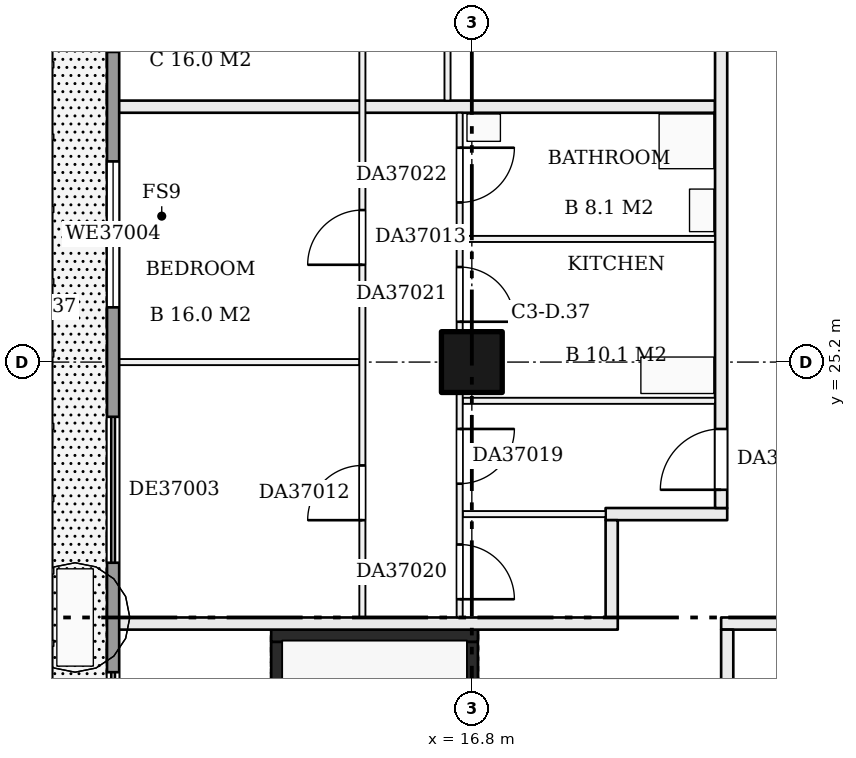
"""IFC4 building model, lengths in metres.
Left out: names, types, materials, properties, quantities, classifications, styles, units other than length and angle.
Written with IfcOpenShell. Run it as: python <this file> out.ifc"""

import sys

from ifc_helpers import new_model, si_unit, direction, frame, frame_2d, origin, origin_2d, place, context, subcontext, project, spatial, rectangle, extrude, element, fill, save


model = new_model("IFC4")
c1 = context("Model", 3, precision=1e-05, world=origin(), true_north=direction((0.0, 1.0)))
c2 = subcontext(c1, "Body", "Model", "MODEL_VIEW")
j1 = project(units=[si_unit("LENGTHUNIT", "METRE"), si_unit("PLANEANGLEUNIT", "RADIAN")], contexts=[c1])
p1 = place(None, origin())
s1 = spatial("IfcSite", under=j1, at=p1, CompositionType="ELEMENT")
p2 = place(p1, origin())
s2 = spatial("IfcBuilding", under=s1, at=p2, CompositionType="ELEMENT")
p3 = place(p2, frame((0.0, 0.0, 147.7)))
s3 = spatial("IfcBuildingStorey", under=s2, at=p3, CompositionType="ELEMENT", Elevation=147.7)
p4 = place(p3, frame((16.8, 25.2, 0.0), z_axis=(0.0, 0.0, 1.0), x_axis=(1.0, 0.0, 0.0)))
e1 = element("IfcColumn", 1, at=p4, inside=s3, PredefinedType="COLUMN", context=c2, shape_type="SweptSolid", body=[
    extrude(rectangle(XDim=1.0, YDim=1.0, at=origin_2d()), origin(), (0.0, 0.0, 1.0), 3.22),
])
p5 = place(p3, frame((13.6, 13.8, 0.0), z_axis=(0.0, 0.0, 1.0), x_axis=(0.0, 1.0, 0.0)))
e2 = element("IfcWall", 2, at=p5, inside=s3, PredefinedType="SHEAR", context=c2, shape_type="SweptSolid", body=[
    extrude(rectangle(XDim=6.8, YDim=0.2, at=frame_2d((3.4, 0.0))), origin(), (0.0, 0.0, 1.0), 3.22),
])
p6 = place(p3, frame((16.8, 13.8, 0.0), z_axis=(0.0, 0.0, 1.0), x_axis=(0.0, 1.0, 0.0)))
e3 = element("IfcWall", 3, at=p6, inside=s3, PredefinedType="SHEAR", context=c2, shape_type="SweptSolid", body=[
    extrude(rectangle(XDim=6.8, YDim=0.2, at=frame_2d((3.4, 0.0))), origin(), (0.0, 0.0, 1.0), 3.22),
])
p7 = place(p6, frame((0.1, 0.0, 0.0)))
e4 = element("IfcOpeningElement", 4, at=p7, cuts=e3, PredefinedType="OPENING", context=c2, shape_type="SweptSolid", body=[
    extrude(rectangle(XDim=1.0, YDim=2.1, at=frame_2d((0.5, 1.05))), frame((0.0, 0.11, 0.0), z_axis=(0.0, -1.0, 0.0), x_axis=(1.0, 0.0, 0.0)), (0.0, 0.0, 1.0), 0.22),
])
p8 = place(p3, frame((13.5, 20.7, 0.0), z_axis=(0.0, 0.0, 1.0), x_axis=(1.0, 0.0, 0.0)))
e5 = element("IfcWall", 5, at=p8, inside=s3, PredefinedType="SHEAR", context=c2, shape_type="SweptSolid", body=[
    extrude(rectangle(XDim=3.4, YDim=0.2, at=frame_2d((1.7, 0.0))), origin(), (0.0, 0.0, 1.0), 3.22),
])
p9 = place(p3, frame((10.9, 20.9, 0.0), z_axis=(0.0, 0.0, 1.0), x_axis=(1.0, 0.0, 0.0)))
e6 = element("IfcWall", 6, at=p9, inside=s3, PredefinedType="PARTITIONING", context=c2, shape_type="SweptSolid", body=[
    extrude(rectangle(XDim=8.3, YDim=0.2, at=frame_2d((4.15, 0.0))), origin(), (0.0, 0.0, 1.0), 3.22),
])
p10 = place(p3, frame((20.9, 20.9, 0.0), z_axis=(0.0, 0.0, 1.0), x_axis=(1.0, 0.0, 0.0)))
e7 = element("IfcWall", 7, at=p10, inside=s3, PredefinedType="PARTITIONING", context=c2, shape_type="SweptSolid", body=[
    extrude(rectangle(XDim=19.3, YDim=0.2, at=frame_2d((9.65, 0.0))), origin(), (0.0, 0.0, 1.0), 3.22),
])
p11 = place(p3, frame((16.65, 22.7, 0.0), z_axis=(0.0, 0.0, 1.0), x_axis=(1.0, 0.0, 0.0)))
e8 = element("IfcWall", 8, at=p11, inside=s3, PredefinedType="PARTITIONING", context=c2, shape_type="SweptSolid", body=[
    extrude(rectangle(XDim=2.35, YDim=0.1, at=frame_2d((1.175, 0.0))), origin(), (0.0, 0.0, 1.0), 3.22),
])
p12 = place(p3, frame((19.0, 22.7, 0.0), z_axis=(0.0, 0.0, 1.0), x_axis=(1.0, 0.0, 0.0)))
e9 = element("IfcWall", 9, at=p12, inside=s3, PredefinedType="PARTITIONING", context=c2, shape_type="SweptSolid", body=[
    extrude(rectangle(XDim=2.0, YDim=0.2, at=frame_2d((1.0, 0.0))), origin(), (0.0, 0.0, 1.0), 3.22),
])
p13 = place(p3, frame((16.65, 24.563, 0.0), z_axis=(0.0, 0.0, 1.0), x_axis=(1.0, 0.0, 0.0)))
e10 = element("IfcWall", 10, at=p13, inside=s3, PredefinedType="PARTITIONING", context=c2, shape_type="SweptSolid", body=[
    extrude(rectangle(XDim=4.15, YDim=0.1, at=frame_2d((2.075, 0.0))), origin(), (0.0, 0.0, 1.0), 3.22),
])
p14 = place(p3, frame((10.9, 25.2, 0.0), z_axis=(0.0, 0.0, 1.0), x_axis=(1.0, 0.0, 0.0)))
e11 = element("IfcWall", 11, at=p14, inside=s3, PredefinedType="PARTITIONING", context=c2, shape_type="SweptSolid", body=[
    extrude(rectangle(XDim=4.05, YDim=0.1, at=frame_2d((2.025, 0.0))), origin(), (0.0, 0.0, 1.0), 3.22),
])
p15 = place(p3, frame((16.65, 27.225, 0.0), z_axis=(0.0, 0.0, 1.0), x_axis=(1.0, 0.0, 0.0)))
e12 = element("IfcWall", 12, at=p15, inside=s3, PredefinedType="PARTITIONING", context=c2, shape_type="SweptSolid", body=[
    extrude(rectangle(XDim=4.15, YDim=0.1, at=frame_2d((2.075, 0.0))), origin(), (0.0, 0.0, 1.0), 3.22),
])
p16 = place(p3, frame((10.9, 29.4, 0.0), z_axis=(0.0, 0.0, 1.0), x_axis=(1.0, 0.0, 0.0)))
e13 = element("IfcWall", 13, at=p16, inside=s3, PredefinedType="PARTITIONING", context=c2, shape_type="SweptSolid", body=[
    extrude(rectangle(XDim=9.9, YDim=0.2, at=frame_2d((4.95, 0.0))), origin(), (0.0, 0.0, 1.0), 3.22),
])
p17 = place(p3, frame((15.0, 21.0, 0.0), z_axis=(0.0, 0.0, 1.0), x_axis=(0.0, 1.0, 0.0)))
e14 = element("IfcWall", 14, at=p17, inside=s3, PredefinedType="PARTITIONING", context=c2, shape_type="SweptSolid", body=[
    extrude(rectangle(XDim=19.0, YDim=0.1, at=frame_2d((9.5, 0.0))), origin(), (0.0, 0.0, 1.0), 3.22),
])
p18 = place(p17, frame((1.6, 0.0, 0.0)))
e15 = element("IfcOpeningElement", 15, at=p18, cuts=e14, PredefinedType="OPENING", context=c2, shape_type="SweptSolid", body=[
    extrude(rectangle(XDim=0.9, YDim=2.1, at=frame_2d((0.45, 1.05))), frame((0.0, 0.06, 0.0), z_axis=(0.0, -1.0, 0.0), x_axis=(1.0, 0.0, 0.0)), (0.0, 0.0, 1.0), 0.12),
])
p19 = place(p17, frame((5.8, 0.0, 0.0)))
e16 = element("IfcOpeningElement", 16, at=p19, cuts=e14, PredefinedType="OPENING", context=c2, shape_type="SweptSolid", body=[
    extrude(rectangle(XDim=0.9, YDim=2.1, at=frame_2d((0.45, 1.05))), frame((0.0, 0.06, 0.0), z_axis=(0.0, -1.0, 0.0), x_axis=(1.0, 0.0, 0.0)), (0.0, 0.0, 1.0), 0.12),
])
p20 = place(p17, frame((10.0, 0.0, 0.0)))
e17 = element("IfcOpeningElement", 17, at=p20, cuts=e14, PredefinedType="OPENING", context=c2, shape_type="SweptSolid", body=[
    extrude(rectangle(XDim=0.9, YDim=2.1, at=frame_2d((0.45, 1.05))), frame((0.0, 0.06, 0.0), z_axis=(0.0, -1.0, 0.0), x_axis=(1.0, 0.0, 0.0)), (0.0, 0.0, 1.0), 0.12),
])
p21 = place(p17, frame((15.4, 0.0, 0.0)))
e18 = element("IfcOpeningElement", 18, at=p21, cuts=e14, PredefinedType="OPENING", context=c2, shape_type="SweptSolid", body=[
    extrude(rectangle(XDim=0.9, YDim=2.1, at=frame_2d((0.45, 1.05))), frame((0.0, 0.06, 0.0), z_axis=(0.0, -1.0, 0.0), x_axis=(1.0, 0.0, 0.0)), (0.0, 0.0, 1.0), 0.12),
])
p22 = place(p3, frame((16.4, 29.5, 0.0), z_axis=(0.0, 0.0, 1.0), x_axis=(0.0, 1.0, 0.0)))
e19 = element("IfcWall", 19, at=p22, inside=s3, PredefinedType="PARTITIONING", context=c2, shape_type="SweptSolid", body=[
    extrude(rectangle(XDim=10.5, YDim=0.1, at=frame_2d((5.25, 0.0))), origin(), (0.0, 0.0, 1.0), 3.22),
])
p23 = place(p22, frame((1.1, 0.0, 0.0)))
e20 = element("IfcOpeningElement", 20, at=p23, cuts=e19, PredefinedType="OPENING", context=c2, shape_type="SweptSolid", body=[
    extrude(rectangle(XDim=0.9, YDim=2.1, at=frame_2d((0.45, 1.05))), frame((0.0, 0.06, 0.0), z_axis=(0.0, -1.0, 0.0), x_axis=(1.0, 0.0, 0.0)), (0.0, 0.0, 1.0), 0.12),
])
p24 = place(p22, frame((4.833, 0.0, 0.0)))
e21 = element("IfcOpeningElement", 21, at=p24, cuts=e19, PredefinedType="OPENING", context=c2, shape_type="SweptSolid", body=[
    extrude(rectangle(XDim=0.9, YDim=2.1, at=frame_2d((0.45, 1.05))), frame((0.0, 0.06, 0.0), z_axis=(0.0, -1.0, 0.0), x_axis=(1.0, 0.0, 0.0)), (0.0, 0.0, 1.0), 0.12),
])
p25 = place(p22, frame((8.467, 0.0, 0.0)))
e22 = element("IfcOpeningElement", 22, at=p25, cuts=e19, PredefinedType="OPENING", context=c2, shape_type="SweptSolid", body=[
    extrude(rectangle(XDim=0.9, YDim=2.1, at=frame_2d((0.45, 1.05))), frame((0.0, 0.06, 0.0), z_axis=(0.0, -1.0, 0.0), x_axis=(1.0, 0.0, 0.0)), (0.0, 0.0, 1.0), 0.12),
])
p26 = place(p3, frame((16.6, 21.0, 0.0), z_axis=(0.0, 0.0, 1.0), x_axis=(0.0, 1.0, 0.0)))
e23 = element("IfcWall", 23, at=p26, inside=s3, PredefinedType="PARTITIONING", context=c2, shape_type="SweptSolid", body=[
    extrude(rectangle(XDim=8.3, YDim=0.1, at=frame_2d((4.15, 0.0))), origin(), (0.0, 0.0, 1.0), 3.22),
])
p27 = place(p26, frame((2.2, 0.0, 0.0)))
e24 = element("IfcOpeningElement", 24, at=p27, cuts=e23, PredefinedType="OPENING", context=c2, shape_type="SweptSolid", body=[
    extrude(rectangle(XDim=0.9, YDim=2.1, at=frame_2d((0.45, 1.05))), frame((0.0, 0.06, 0.0), z_axis=(0.0, -1.0, 0.0), x_axis=(1.0, 0.0, 0.0)), (0.0, 0.0, 1.0), 0.12),
])
p28 = place(p26, frame((0.3, 0.0, 0.0)))
e25 = element("IfcOpeningElement", 25, at=p28, cuts=e23, PredefinedType="OPENING", context=c2, shape_type="SweptSolid", body=[
    extrude(rectangle(XDim=0.9, YDim=2.1, at=frame_2d((0.45, 1.05))), frame((0.0, 0.06, 0.0), z_axis=(0.0, -1.0, 0.0), x_axis=(1.0, 0.0, 0.0)), (0.0, 0.0, 1.0), 0.12),
])
p29 = place(p26, frame((4.863, 0.0, 0.0)))
e26 = element("IfcOpeningElement", 26, at=p29, cuts=e23, PredefinedType="OPENING", context=c2, shape_type="SweptSolid", body=[
    extrude(rectangle(XDim=0.9, YDim=2.1, at=frame_2d((0.45, 1.05))), frame((0.0, 0.06, 0.0), z_axis=(0.0, -1.0, 0.0), x_axis=(1.0, 0.0, 0.0)), (0.0, 0.0, 1.0), 0.12),
])
p30 = place(p26, frame((6.825, 0.0, 0.0)))
e27 = element("IfcOpeningElement", 27, at=p30, cuts=e23, PredefinedType="OPENING", context=c2, shape_type="SweptSolid", body=[
    extrude(rectangle(XDim=0.9, YDim=2.1, at=frame_2d((0.45, 1.05))), frame((0.0, 0.06, 0.0), z_axis=(0.0, -1.0, 0.0), x_axis=(1.0, 0.0, 0.0)), (0.0, 0.0, 1.0), 0.12),
])
p31 = place(p3, frame((19.1, 21.0, 0.0), z_axis=(0.0, 0.0, 1.0), x_axis=(0.0, 1.0, 0.0)))
e28 = element("IfcWall", 28, at=p31, inside=s3, PredefinedType="PARTITIONING", context=c2, shape_type="SweptSolid", body=[
    extrude(rectangle(XDim=1.6, YDim=0.2, at=frame_2d((0.8, 0.0))), origin(), (0.0, 0.0, 1.0), 3.22),
])
p32 = place(p3, frame((20.9, 22.8, 0.0), z_axis=(0.0, 0.0, 1.0), x_axis=(0.0, 1.0, 0.0)))
e29 = element("IfcWall", 29, at=p32, inside=s3, PredefinedType="PARTITIONING", context=c2, shape_type="SweptSolid", body=[
    extrude(rectangle(XDim=17.2, YDim=0.2, at=frame_2d((8.6, 0.0))), origin(), (0.0, 0.0, 1.0), 3.22),
])
p33 = place(p32, frame((0.3, 0.0, 0.0)))
e30 = element("IfcOpeningElement", 30, at=p33, cuts=e29, PredefinedType="OPENING", context=c2, shape_type="SweptSolid", body=[
    extrude(rectangle(XDim=1.0, YDim=2.1, at=frame_2d((0.5, 1.05))), frame((0.0, 0.11, 0.0), z_axis=(0.0, -1.0, 0.0), x_axis=(1.0, 0.0, 0.0)), (0.0, 0.0, 1.0), 0.22),
])
p34 = place(p32, frame((7.7, 0.0, 0.0)))
e31 = element("IfcOpeningElement", 31, at=p34, cuts=e29, PredefinedType="OPENING", context=c2, shape_type="SweptSolid", body=[
    extrude(rectangle(XDim=1.0, YDim=2.1, at=frame_2d((0.5, 1.05))), frame((0.0, 0.11, 0.0), z_axis=(0.0, -1.0, 0.0), x_axis=(1.0, 0.0, 0.0)), (0.0, 0.0, 1.0), 0.22),
])
p35 = place(p3, frame((21.0, 13.7, 0.0), z_axis=(0.0, 0.0, 1.0), x_axis=(0.0, 1.0, 0.0)))
e32 = element("IfcWall", 32, at=p35, inside=s3, PredefinedType="PARTITIONING", context=c2, shape_type="SweptSolid", body=[
    extrude(rectangle(XDim=7.1, YDim=0.2, at=frame_2d((3.55, 0.0))), origin(), (0.0, 0.0, 1.0), 3.22),
])
p36 = place(p35, frame((4.5, 0.0, 0.0)))
e33 = element("IfcOpeningElement", 33, at=p36, cuts=e32, PredefinedType="OPENING", context=c2, shape_type="SweptSolid", body=[
    extrude(rectangle(XDim=1.0, YDim=2.1, at=frame_2d((0.5, 1.05))), frame((0.0, 0.11, 0.0), z_axis=(0.0, -1.0, 0.0), x_axis=(1.0, 0.0, 0.0)), (0.0, 0.0, 1.0), 0.22),
])
p37 = place(p3, frame((10.9, 42.0, 0.0), z_axis=(0.0, 0.0, 1.0), x_axis=(0.0, -1.0, 0.0)))
e34 = element("IfcWall", 34, at=p37, inside=s3, PredefinedType="SOLIDWALL", context=c2, shape_type="SweptSolid", body=[
    extrude(rectangle(XDim=28.6, YDim=0.2, at=frame_2d((14.3, 0.0))), origin(), (0.0, 0.0, 1.0), 3.22),
])
p38 = place(p37, frame((25.9, 0.0, 0.0)))
e35 = element("IfcOpeningElement", 35, at=p38, cuts=e34, PredefinedType="OPENING", context=c2, shape_type="SweptSolid", body=[
    extrude(rectangle(XDim=2.4, YDim=2.2, at=frame_2d((1.2, 1.1))), frame((0.0, 0.11, 0.0), z_axis=(0.0, -1.0, 0.0), x_axis=(1.0, 0.0, 0.0)), (0.0, 0.0, 1.0), 0.22),
])
p39 = place(p37, frame((21.9, 0.0, 0.0)))
e36 = element("IfcOpeningElement", 36, at=p39, cuts=e34, PredefinedType="OPENING", context=c2, shape_type="SweptSolid", body=[
    extrude(rectangle(XDim=2.4, YDim=2.2, at=frame_2d((1.2, 1.1))), frame((0.0, 0.11, 0.0), z_axis=(0.0, -1.0, 0.0), x_axis=(1.0, 0.0, 0.0)), (0.0, 0.0, 1.0), 0.22),
])
p40 = place(p37, frame((17.7, 0.0, 0.0)))
e37 = element("IfcOpeningElement", 37, at=p40, cuts=e34, PredefinedType="OPENING", context=c2, shape_type="SweptSolid", body=[
    extrude(rectangle(XDim=2.4, YDim=2.2, at=frame_2d((1.2, 1.1))), frame((0.0, 0.11, 0.0), z_axis=(0.0, -1.0, 0.0), x_axis=(1.0, 0.0, 0.0)), (0.0, 0.0, 1.0), 0.22),
])
p41 = place(p37, frame((13.5, 0.0, 0.9)))
e38 = element("IfcOpeningElement", 38, at=p41, cuts=e34, PredefinedType="OPENING", context=c2, shape_type="SweptSolid", body=[
    extrude(rectangle(XDim=2.4, YDim=1.5, at=frame_2d((1.2, 0.75))), frame((0.0, 0.11, 0.0), z_axis=(0.0, -1.0, 0.0), x_axis=(1.0, 0.0, 0.0)), (0.0, 0.0, 1.0), 0.22),
])
p42 = place(p37, frame((9.3, 0.0, 0.9)))
e39 = element("IfcOpeningElement", 39, at=p42, cuts=e34, PredefinedType="OPENING", context=c2, shape_type="SweptSolid", body=[
    extrude(rectangle(XDim=2.4, YDim=1.5, at=frame_2d((1.2, 0.75))), frame((0.0, 0.11, 0.0), z_axis=(0.0, -1.0, 0.0), x_axis=(1.0, 0.0, 0.0)), (0.0, 0.0, 1.0), 0.22),
])
p43 = place(p37, frame((5.1, 0.0, 0.0)))
e40 = element("IfcOpeningElement", 40, at=p43, cuts=e34, PredefinedType="OPENING", context=c2, shape_type="SweptSolid", body=[
    extrude(rectangle(XDim=2.4, YDim=2.2, at=frame_2d((1.2, 1.1))), frame((0.0, 0.11, 0.0), z_axis=(0.0, -1.0, 0.0), x_axis=(1.0, 0.0, 0.0)), (0.0, 0.0, 1.0), 0.22),
])
p44 = place(p37, frame((2.0, 0.0, 0.0)))
e41 = element("IfcOpeningElement", 41, at=p44, cuts=e34, PredefinedType="OPENING", context=c2, shape_type="SweptSolid", body=[
    extrude(rectangle(XDim=1.3, YDim=2.2, at=frame_2d((0.65, 1.1))), frame((0.0, 0.11, 0.0), z_axis=(0.0, -1.0, 0.0), x_axis=(1.0, 0.0, 0.0)), (0.0, 0.0, 1.0), 0.22),
])
p45 = place(p18, origin())
e42 = element("IfcDoor", 42, at=p45, inside=s3, OperationType="SINGLE_SWING_LEFT", PredefinedType="DOOR", context=c2, shape_type="SweptSolid", body=[
    extrude(rectangle(XDim=0.9, YDim=2.1, at=frame_2d((0.45, 1.05))), frame((0.0, 0.025, 0.0), z_axis=(0.0, -1.0, 0.0), x_axis=(1.0, 0.0, 0.0)), (0.0, 0.0, 1.0), 0.05),
])
fill(e15, e42)
p46 = place(p19, origin())
e43 = element("IfcDoor", 43, at=p46, inside=s3, OperationType="SINGLE_SWING_LEFT", PredefinedType="DOOR", context=c2, shape_type="SweptSolid", body=[
    extrude(rectangle(XDim=0.9, YDim=2.1, at=frame_2d((0.45, 1.05))), frame((0.0, 0.025, 0.0), z_axis=(0.0, -1.0, 0.0), x_axis=(1.0, 0.0, 0.0)), (0.0, 0.0, 1.0), 0.05),
])
fill(e16, e43)
p47 = place(p27, frame((0.9, 0.0, 0.0), z_axis=(0.0, 0.0, 1.0), x_axis=(-1.0, 0.0, 0.0)))
e44 = element("IfcDoor", 44, at=p47, inside=s3, OperationType="SINGLE_SWING_LEFT", PredefinedType="DOOR", context=c2, shape_type="SweptSolid", body=[
    extrude(rectangle(XDim=0.9, YDim=2.1, at=frame_2d((0.45, 1.05))), frame((0.0, 0.025, 0.0), z_axis=(0.0, -1.0, 0.0), x_axis=(1.0, 0.0, 0.0)), (0.0, 0.0, 1.0), 0.05),
])
fill(e24, e44)
p48 = place(p28, frame((0.9, 0.0, 0.0), z_axis=(0.0, 0.0, 1.0), x_axis=(-1.0, 0.0, 0.0)))
e45 = element("IfcDoor", 45, at=p48, inside=s3, OperationType="SINGLE_SWING_RIGHT", PredefinedType="DOOR", context=c2, shape_type="SweptSolid", body=[
    extrude(rectangle(XDim=0.9, YDim=2.1, at=frame_2d((0.45, 1.05))), frame((0.0, 0.025, 0.0), z_axis=(0.0, -1.0, 0.0), x_axis=(1.0, 0.0, 0.0)), (0.0, 0.0, 1.0), 0.05),
])
fill(e25, e45)
p49 = place(p29, frame((0.9, 0.0, 0.0), z_axis=(0.0, 0.0, 1.0), x_axis=(-1.0, 0.0, 0.0)))
e46 = element("IfcDoor", 46, at=p49, inside=s3, OperationType="SINGLE_SWING_RIGHT", PredefinedType="DOOR", context=c2, shape_type="SweptSolid", body=[
    extrude(rectangle(XDim=0.9, YDim=2.1, at=frame_2d((0.45, 1.05))), frame((0.0, 0.025, 0.0), z_axis=(0.0, -1.0, 0.0), x_axis=(1.0, 0.0, 0.0)), (0.0, 0.0, 1.0), 0.05),
])
fill(e26, e46)
p50 = place(p30, frame((0.9, 0.0, 0.0), z_axis=(0.0, 0.0, 1.0), x_axis=(-1.0, 0.0, 0.0)))
e47 = element("IfcDoor", 47, at=p50, inside=s3, OperationType="SINGLE_SWING_LEFT", PredefinedType="DOOR", context=c2, shape_type="SweptSolid", body=[
    extrude(rectangle(XDim=0.9, YDim=2.1, at=frame_2d((0.45, 1.05))), frame((0.0, 0.025, 0.0), z_axis=(0.0, -1.0, 0.0), x_axis=(1.0, 0.0, 0.0)), (0.0, 0.0, 1.0), 0.05),
])
fill(e27, e47)
p51 = place(p33, origin())
e48 = element("IfcDoor", 48, at=p51, inside=s3, OperationType="SINGLE_SWING_LEFT", PredefinedType="DOOR", context=c2, shape_type="SweptSolid", body=[
    extrude(rectangle(XDim=1.0, YDim=2.1, at=frame_2d((0.5, 1.05))), frame((0.0, 0.025, 0.0), z_axis=(0.0, -1.0, 0.0), x_axis=(1.0, 0.0, 0.0)), (0.0, 0.0, 1.0), 0.05),
])
fill(e30, e48)
p52 = place(p39, origin())
e49 = element("IfcDoor", 49, at=p52, inside=s3, OperationType="DOUBLE_DOOR_SLIDING", PredefinedType="DOOR", context=c2, shape_type="SweptSolid", body=[
    extrude(rectangle(XDim=2.4, YDim=2.2, at=frame_2d((1.2, 1.1))), frame((0.0, 0.025, 0.0), z_axis=(0.0, -1.0, 0.0), x_axis=(1.0, 0.0, 0.0)), (0.0, 0.0, 1.0), 0.05),
])
fill(e36, e49)
p53 = place(p40, origin())
e50 = element("IfcDoor", 50, at=p53, inside=s3, OperationType="DOUBLE_DOOR_SLIDING", PredefinedType="DOOR", context=c2, shape_type="SweptSolid", body=[
    extrude(rectangle(XDim=2.4, YDim=2.2, at=frame_2d((1.2, 1.1))), frame((0.0, 0.025, 0.0), z_axis=(0.0, -1.0, 0.0), x_axis=(1.0, 0.0, 0.0)), (0.0, 0.0, 1.0), 0.05),
])
fill(e37, e50)
p54 = place(p41, origin())
e51 = element("IfcWindow", 51, at=p54, inside=s3, PartitioningType="SINGLE_PANEL", PredefinedType="WINDOW", context=c2, shape_type="SweptSolid", body=[
    extrude(rectangle(XDim=2.4, YDim=1.5, at=frame_2d((1.2, 0.75))), frame((0.0, 0.03, 0.0), z_axis=(0.0, -1.0, 0.0), x_axis=(1.0, 0.0, 0.0)), (0.0, 0.0, 1.0), 0.06),
])
fill(e38, e51)
save(model, sys.argv[1])
